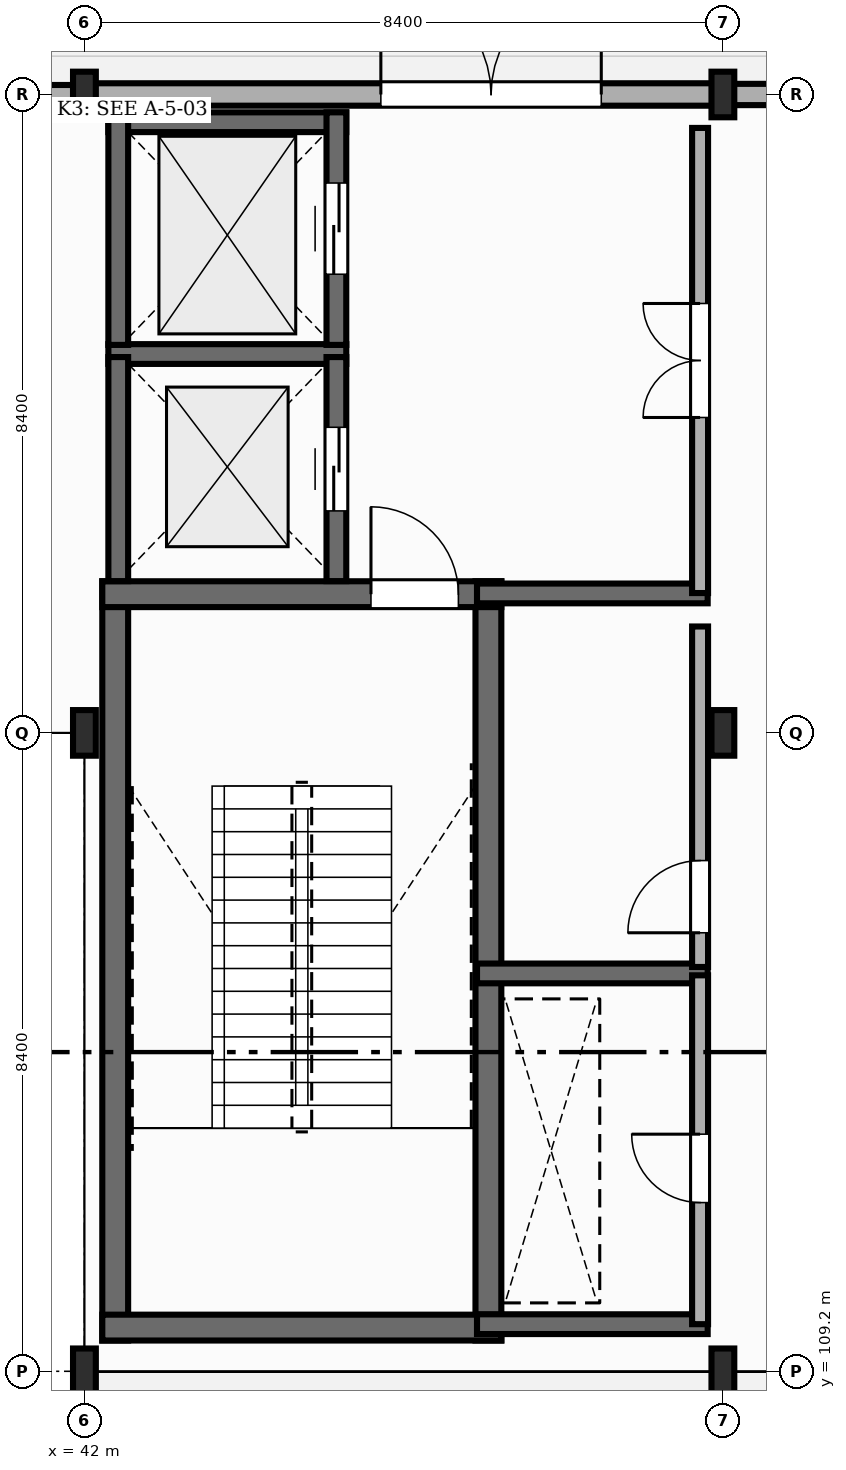
"""IFC4 building model, lengths in metres.
Left out: names, types, materials, properties, quantities, classifications, styles, units other than length and angle.
Written with IfcOpenShell. Run it as: python <this file> out.ifc"""

import sys

from ifc_helpers import new_model, si_unit, direction, frame, frame_2d, origin, origin_2d, place, context, subcontext, project, spatial, rectangle, i_section, extrude, element, fill, save


model = new_model("IFC4")
c1 = context("Model", 3, precision=1e-05, world=origin(), true_north=direction((0.0, 1.0)))
c2 = subcontext(c1, "Body", "Model", "MODEL_VIEW")
j1 = project(units=[si_unit("LENGTHUNIT", "METRE"), si_unit("PLANEANGLEUNIT", "RADIAN")], contexts=[c1])
p1 = place(None, origin())
s1 = spatial("IfcSite", under=j1, at=p1, CompositionType="ELEMENT")
p2 = place(p1, origin())
s2 = spatial("IfcBuilding", under=s1, at=p2, CompositionType="ELEMENT")
p3 = place(p2, origin())
s3 = spatial("IfcBuildingStorey", under=s2, at=p3, CompositionType="ELEMENT", Elevation=0.0)
for number, where, z_axis, x_axis in (
    (1, (42.0, 109.2, 0.0), (0.0, 0.0, 1.0), (1.0, 0.0, 0.0)),
    (2, (42.0, 117.6, 0.0), (0.0, 0.0, 1.0), (1.0, 0.0, 0.0)),
    (3, (42.0, 126.0, 0.0), (0.0, 0.0, 1.0), (1.0, 0.0, 0.0)),
    (4, (50.4, 109.2, 0.0), (0.0, 0.0, 1.0), (1.0, 0.0, 0.0)),
    (5, (50.4, 117.6, 0.0), (0.0, 0.0, 1.0), (1.0, 0.0, 0.0)),
    (6, (50.4, 126.0, 0.0), (0.0, 0.0, 1.0), (1.0, 0.0, 0.0)),
):
    element("IfcColumn", number, at=place(p3, frame(where, z_axis=z_axis, x_axis=x_axis)), inside=s3, PredefinedType="COLUMN", context=c2, shape_type="SweptSolid", body=[
        extrude(i_section(OverallWidth=0.3, OverallDepth=0.6, WebThickness=0.015, FlangeThickness=0.03, FilletRadius=0.027, at=origin_2d()), origin(), (0.0, 0.0, 1.0), 5.4),
    ])
p4 = place(p3, frame((58.792, 126.0, 0.0), z_axis=(0.0, 0.0, 1.0), x_axis=(-1.0, 0.0, 0.0)))
e7 = element("IfcWall", 7, at=p4, inside=s3, PredefinedType="STANDARD", context=c2, shape_type="SweptSolid", body=[
    extrude(rectangle(XDim=8.384, YDim=0.28, at=frame_2d((4.192, 0.0))), origin(), (0.0, 0.0, 1.0), 4.827),
])
p5 = place(p3, frame((42.008, 126.0, 0.0), z_axis=(0.0, 0.0, 1.0), x_axis=(1.0, 0.0, 0.0)))
e8 = element("IfcWall", 8, at=p5, inside=s3, PredefinedType="STANDARD", context=c2, shape_type="SweptSolid", body=[
    extrude(rectangle(XDim=8.384, YDim=0.295, at=frame_2d((4.192, 0.0))), origin(), (0.0, 0.0, 1.0), 4.797),
])
p6 = place(p5, frame((3.892, 0.0, 0.0)))
e9 = element("IfcOpeningElement", 9, at=p6, cuts=e8, PredefinedType="OPENING", context=c2, shape_type="SweptSolid", body=[
    extrude(rectangle(XDim=2.9, YDim=2.38, at=frame_2d((1.45, 1.19))), frame((0.0, 0.157, 0.0), z_axis=(0.0, -1.0, 0.0), x_axis=(1.0, 0.0, 0.0)), (0.0, 0.0, 1.0), 0.315),
])
p7 = place(p3, frame((41.992, 126.0, 0.0), z_axis=(0.0, 0.0, 1.0), x_axis=(-1.0, 0.0, 0.0)))
e10 = element("IfcWall", 10, at=p7, inside=s3, PredefinedType="STANDARD", context=c2, shape_type="SweptSolid", body=[
    extrude(rectangle(XDim=8.384, YDim=0.25, at=frame_2d((4.192, 0.0))), origin(), (0.0, 0.0, 1.0), 4.827),
])
for number, where, z_axis, x_axis in (
    (11, (42.405, 109.605, 0.0), (0.0, 0.0, 1.0), (0.0, 1.0, 0.0)),
    (12, (47.315, 109.605, 0.0), (0.0, 0.0, 1.0), (0.0, 1.0, 0.0)),
):
    element("IfcWall", number, at=place(p3, frame(where, z_axis=z_axis, x_axis=x_axis)), inside=s3, PredefinedType="SHEAR", context=c2, shape_type="SweptSolid", body=[
        extrude(rectangle(XDim=9.99, YDim=0.34, at=frame_2d((4.995, 0.0))), origin(), (0.0, 0.0, 1.0), 5.175),
    ])
p8 = place(p3, frame((42.235, 109.775, 0.0), z_axis=(0.0, 0.0, 1.0), x_axis=(1.0, 0.0, 0.0)))
e13 = element("IfcWall", 13, at=p8, inside=s3, PredefinedType="SHEAR", context=c2, shape_type="SweptSolid", body=[
    extrude(rectangle(XDim=5.25, YDim=0.34, at=frame_2d((2.625, 0.0))), origin(), (0.0, 0.0, 1.0), 5.175),
])
p9 = place(p3, frame((42.235, 119.425, 0.0), z_axis=(0.0, 0.0, 1.0), x_axis=(1.0, 0.0, 0.0)))
e14 = element("IfcWall", 14, at=p9, inside=s3, PredefinedType="SHEAR", context=c2, shape_type="SweptSolid", body=[
    extrude(rectangle(XDim=5.25, YDim=0.34, at=frame_2d((2.625, 0.0))), origin(), (0.0, 0.0, 1.0), 5.175),
])
p10 = place(p9, frame((3.535, 0.0, 0.0)))
e15 = element("IfcOpeningElement", 15, at=p10, cuts=e14, PredefinedType="OPENING", context=c2, shape_type="SweptSolid", body=[
    extrude(rectangle(XDim=1.15, YDim=2.15, at=frame_2d((0.575, 1.075))), frame((0.0, 0.18, 0.0), z_axis=(0.0, -1.0, 0.0), x_axis=(1.0, 0.0, 0.0)), (0.0, 0.0, 1.0), 0.36),
])
p11 = place(p3, frame((42.315, 122.585, 0.0), z_axis=(0.0, 0.0, 1.0), x_axis=(1.0, 0.0, 0.0)))
e16 = element("IfcWall", 16, at=p11, inside=s3, PredefinedType="SHEAR", context=c2, shape_type="SweptSolid", body=[
    extrude(rectangle(XDim=3.13, YDim=0.26, at=frame_2d((1.565, 0.0))), origin(), (0.0, 0.0, 1.0), 5.175),
])
p12 = place(p3, frame((42.445, 119.597, 0.0), z_axis=(0.0, 0.0, 1.0), x_axis=(0.0, 1.0, 0.0)))
e17 = element("IfcWall", 17, at=p12, inside=s3, PredefinedType="SHEAR", context=c2, shape_type="SweptSolid", body=[
    extrude(rectangle(XDim=2.948, YDim=0.26, at=frame_2d((1.474, 0.0))), origin(), (0.0, 0.0, 1.0), 5.175),
])
p13 = place(p3, frame((45.315, 119.597, 0.0), z_axis=(0.0, 0.0, 1.0), x_axis=(0.0, 1.0, 0.0)))
e18 = element("IfcWall", 18, at=p13, inside=s3, PredefinedType="SHEAR", context=c2, shape_type="SweptSolid", body=[
    extrude(rectangle(XDim=2.948, YDim=0.26, at=frame_2d((1.474, 0.0))), origin(), (0.0, 0.0, 1.0), 5.175),
])
p14 = place(p13, frame((0.924, 0.0, 0.0)))
e19 = element("IfcOpeningElement", 19, at=p14, cuts=e18, PredefinedType="OPENING", context=c2, shape_type="SweptSolid", body=[
    extrude(rectangle(XDim=1.1, YDim=2.15, at=frame_2d((0.55, 1.075))), frame((0.0, 0.14, 0.0), z_axis=(0.0, -1.0, 0.0), x_axis=(1.0, 0.0, 0.0)), (0.0, 0.0, 1.0), 0.28),
])
p15 = place(p3, frame((42.315, 125.635, 0.0), z_axis=(0.0, 0.0, 1.0), x_axis=(1.0, 0.0, 0.0)))
e20 = element("IfcWall", 20, at=p15, inside=s3, PredefinedType="SHEAR", context=c2, shape_type="SweptSolid", body=[
    extrude(rectangle(XDim=3.13, YDim=0.26, at=frame_2d((1.565, 0.0))), origin(), (0.0, 0.0, 1.0), 5.175),
])
p16 = place(p3, frame((42.445, 122.705, 0.0), z_axis=(0.0, 0.0, 1.0), x_axis=(0.0, 1.0, 0.0)))
e21 = element("IfcWall", 21, at=p16, inside=s3, PredefinedType="SHEAR", context=c2, shape_type="SweptSolid", body=[
    extrude(rectangle(XDim=3.06, YDim=0.26, at=frame_2d((1.53, 0.0))), origin(), (0.0, 0.0, 1.0), 5.175),
])
p17 = place(p3, frame((45.315, 122.705, 0.0), z_axis=(0.0, 0.0, 1.0), x_axis=(0.0, 1.0, 0.0)))
e22 = element("IfcWall", 22, at=p17, inside=s3, PredefinedType="SHEAR", context=c2, shape_type="SweptSolid", body=[
    extrude(rectangle(XDim=3.06, YDim=0.26, at=frame_2d((1.53, 0.0))), origin(), (0.0, 0.0, 1.0), 5.175),
])
p18 = place(p17, frame((0.93, 0.0, 0.0)))
e23 = element("IfcOpeningElement", 23, at=p18, cuts=e22, PredefinedType="OPENING", context=c2, shape_type="SweptSolid", body=[
    extrude(rectangle(XDim=1.2, YDim=2.15, at=frame_2d((0.6, 1.075))), frame((0.0, 0.14, 0.0), z_axis=(0.0, -1.0, 0.0), x_axis=(1.0, 0.0, 0.0)), (0.0, 0.0, 1.0), 0.28),
])
for number, where, z_axis, x_axis in (
    (24, (47.165, 109.82, 0.0), (0.0, 0.0, 1.0), (1.0, 0.0, 0.0)),
    (25, (47.165, 114.435, 0.0), (0.0, 0.0, 1.0), (1.0, 0.0, 0.0)),
    (26, (47.165, 119.435, 0.0), (0.0, 0.0, 1.0), (1.0, 0.0, 0.0)),
):
    element("IfcWall", number, at=place(p3, frame(where, z_axis=z_axis, x_axis=x_axis)), inside=s3, PredefinedType="SHEAR", context=c2, shape_type="SweptSolid", body=[
        extrude(rectangle(XDim=3.035, YDim=0.26, at=frame_2d((1.518, 0.0))), origin(), (0.0, 0.0, 1.0), 5.175),
    ])
p19 = place(p3, frame((50.1, 109.82, 0.0), z_axis=(0.0, 0.0, 1.0), x_axis=(0.0, 1.0, 0.0)))
e27 = element("IfcWall", 27, at=p19, inside=s3, PredefinedType="STANDARD", context=c2, shape_type="SweptSolid", body=[
    extrude(rectangle(XDim=4.59, YDim=0.21, at=frame_2d((2.295, 0.0))), origin(), (0.0, 0.0, 1.0), 4.667),
])
p20 = place(p19, frame((1.6, 0.0, 0.0)))
e28 = element("IfcOpeningElement", 28, at=p20, cuts=e27, PredefinedType="OPENING", context=c2, shape_type="SweptSolid", body=[
    extrude(rectangle(XDim=0.9, YDim=2.1, at=frame_2d((0.45, 1.05))), frame((0.0, 0.115, 0.0), z_axis=(0.0, -1.0, 0.0), x_axis=(1.0, 0.0, 0.0)), (0.0, 0.0, 1.0), 0.23),
])
p21 = place(p3, frame((50.1, 114.52, 0.0), z_axis=(0.0, 0.0, 1.0), x_axis=(0.0, 1.0, 0.0)))
e29 = element("IfcWall", 29, at=p21, inside=s3, PredefinedType="STANDARD", context=c2, shape_type="SweptSolid", body=[
    extrude(rectangle(XDim=4.48, YDim=0.21, at=frame_2d((2.24, 0.0))), origin(), (0.0, 0.0, 1.0), 4.667),
])
p22 = place(p21, frame((0.45, 0.0, 0.0)))
e30 = element("IfcOpeningElement", 30, at=p22, cuts=e29, PredefinedType="OPENING", context=c2, shape_type="SweptSolid", body=[
    extrude(rectangle(XDim=0.95, YDim=2.15, at=frame_2d((0.475, 1.075))), frame((0.0, 0.115, 0.0), z_axis=(0.0, -1.0, 0.0), x_axis=(1.0, 0.0, 0.0)), (0.0, 0.0, 1.0), 0.23),
])
p23 = place(p3, frame((50.1, 119.44, 0.0), z_axis=(0.0, 0.0, 1.0), x_axis=(0.0, 1.0, 0.0)))
e31 = element("IfcWall", 31, at=p23, inside=s3, PredefinedType="STANDARD", context=c2, shape_type="SweptSolid", body=[
    extrude(rectangle(XDim=6.12, YDim=0.21, at=frame_2d((3.06, 0.0))), origin(), (0.0, 0.0, 1.0), 4.757),
])
p24 = place(p23, frame((2.31, 0.0, 0.0)))
e32 = element("IfcOpeningElement", 32, at=p24, cuts=e31, PredefinedType="OPENING", context=c2, shape_type="SweptSolid", body=[
    extrude(rectangle(XDim=1.5, YDim=2.2, at=frame_2d((0.75, 1.1))), frame((0.0, 0.115, 0.0), z_axis=(0.0, -1.0, 0.0), x_axis=(1.0, 0.0, 0.0)), (0.0, 0.0, 1.0), 0.23),
])
p25 = place(p6, origin())
e33 = element("IfcDoor", 33, at=p25, inside=s3, OperationType="DOUBLE_DOOR_SINGLE_SWING", PredefinedType="DOOR", context=c2, shape_type="SweptSolid", body=[
    extrude(rectangle(XDim=2.9, YDim=2.38, at=frame_2d((1.45, 1.19))), frame((0.0, 0.025, 0.0), z_axis=(0.0, -1.0, 0.0), x_axis=(1.0, 0.0, 0.0)), (0.0, 0.0, 1.0), 0.05),
])
fill(e9, e33)
p26 = place(p10, origin())
e34 = element("IfcDoor", 34, at=p26, inside=s3, OperationType="SINGLE_SWING_LEFT", PredefinedType="DOOR", context=c2, shape_type="SweptSolid", body=[
    extrude(rectangle(XDim=1.15, YDim=2.15, at=frame_2d((0.575, 1.075))), frame((0.0, 0.025, 0.0), z_axis=(0.0, -1.0, 0.0), x_axis=(1.0, 0.0, 0.0)), (0.0, 0.0, 1.0), 0.05),
])
fill(e15, e34)
p27 = place(p14, origin())
e35 = element("IfcDoor", 35, at=p27, inside=s3, OperationType="DOUBLE_DOOR_SLIDING", PredefinedType="DOOR", context=c2, shape_type="SweptSolid", body=[
    extrude(rectangle(XDim=1.1, YDim=2.15, at=frame_2d((0.55, 1.075))), frame((0.0, 0.025, 0.0), z_axis=(0.0, -1.0, 0.0), x_axis=(1.0, 0.0, 0.0)), (0.0, 0.0, 1.0), 0.05),
])
fill(e19, e35)
p28 = place(p18, origin())
e36 = element("IfcDoor", 36, at=p28, inside=s3, OperationType="DOUBLE_DOOR_SLIDING", PredefinedType="DOOR", context=c2, shape_type="SweptSolid", body=[
    extrude(rectangle(XDim=1.2, YDim=2.15, at=frame_2d((0.6, 1.075))), frame((0.0, 0.025, 0.0), z_axis=(0.0, -1.0, 0.0), x_axis=(1.0, 0.0, 0.0)), (0.0, 0.0, 1.0), 0.05),
])
fill(e23, e36)
p29 = place(p20, origin())
e37 = element("IfcDoor", 37, at=p29, inside=s3, OperationType="SINGLE_SWING_RIGHT", PredefinedType="DOOR", context=c2, shape_type="SweptSolid", body=[
    extrude(rectangle(XDim=0.9, YDim=2.1, at=frame_2d((0.45, 1.05))), frame((0.0, 0.025, 0.0), z_axis=(0.0, -1.0, 0.0), x_axis=(1.0, 0.0, 0.0)), (0.0, 0.0, 1.0), 0.05),
])
fill(e28, e37)
p30 = place(p22, origin())
e38 = element("IfcDoor", 38, at=p30, inside=s3, OperationType="SINGLE_SWING_LEFT", PredefinedType="DOOR", context=c2, shape_type="SweptSolid", body=[
    extrude(rectangle(XDim=0.95, YDim=2.15, at=frame_2d((0.475, 1.075))), frame((0.0, 0.025, 0.0), z_axis=(0.0, -1.0, 0.0), x_axis=(1.0, 0.0, 0.0)), (0.0, 0.0, 1.0), 0.05),
])
fill(e30, e38)
p31 = place(p24, origin())
e39 = element("IfcDoor", 39, at=p31, inside=s3, OperationType="DOUBLE_DOOR_SINGLE_SWING", PredefinedType="DOOR", context=c2, shape_type="SweptSolid", body=[
    extrude(rectangle(XDim=1.5, YDim=2.2, at=frame_2d((0.75, 1.1))), frame((0.0, 0.025, 0.0), z_axis=(0.0, -1.0, 0.0), x_axis=(1.0, 0.0, 0.0)), (0.0, 0.0, 1.0), 0.05),
])
fill(e32, e39)
save(model, sys.argv[1])
